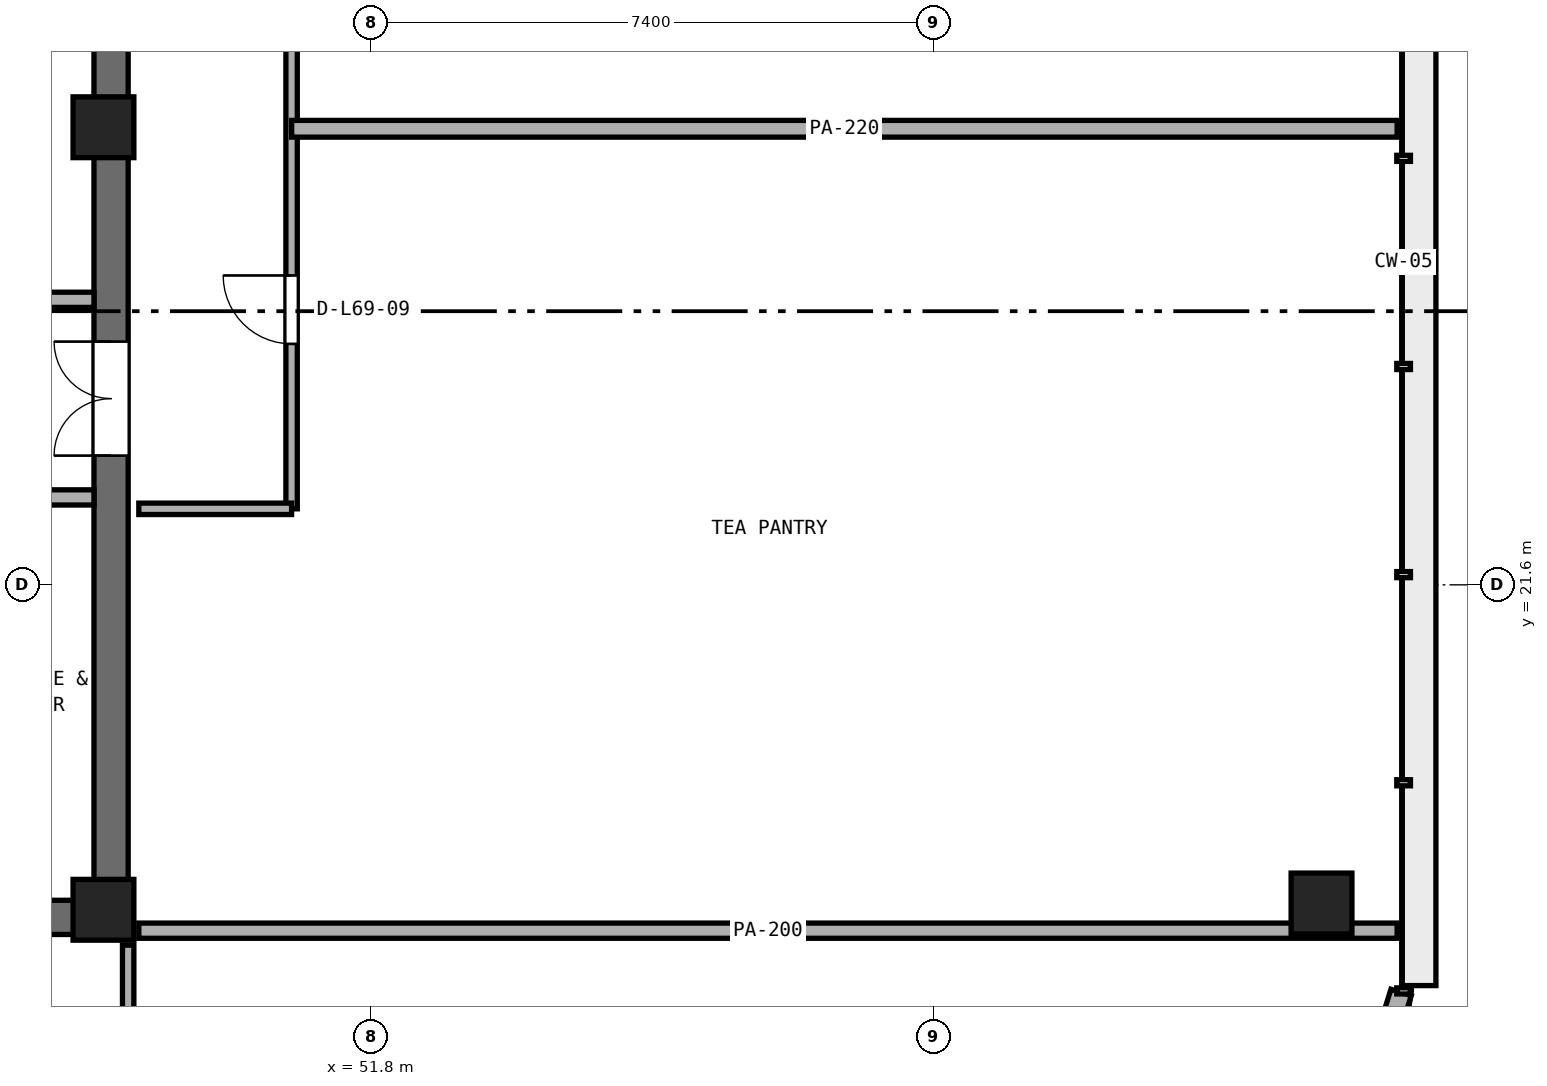
"""IFC4 building model, lengths in metres.
Left out: names, types, materials, properties, quantities, classifications, styles, units other than length and angle.
Written with IfcOpenShell. Run it as: python <this file> out.ifc"""

import sys

from ifc_helpers import new_model, si_unit, direction, frame, frame_2d, origin, origin_2d, place, context, subcontext, project, spatial, rectangle, extrude, element, fill, save


model = new_model("IFC4")
c1 = context("Model", 3, precision=1e-05, world=origin(), true_north=direction((0.0, 1.0)))
c2 = subcontext(c1, "Body", "Model", "MODEL_VIEW")
j1 = project(units=[si_unit("LENGTHUNIT", "METRE"), si_unit("PLANEANGLEUNIT", "RADIAN")], contexts=[c1])
p1 = place(None, origin())
s1 = spatial("IfcSite", under=j1, at=p1, CompositionType="ELEMENT")
p2 = place(p1, origin())
s2 = spatial("IfcBuilding", under=s1, at=p2, CompositionType="ELEMENT")
p3 = place(p2, frame((0.0, 0.0, 270.6)))
s3 = spatial("IfcBuildingStorey", under=s2, at=p3, CompositionType="ELEMENT", Elevation=270.6)
p4 = place(p3, frame((25.4, 17.225, 0.0), z_axis=(0.0, 0.0, 1.0), x_axis=(1.0, 0.0, 0.0)))
e1 = element("IfcWall", 1, at=p4, inside=s3, PredefinedType="SHEAR", context=c2, shape_type="SweptSolid", body=[
    extrude(rectangle(XDim=23.2, YDim=0.45, at=frame_2d((11.6, 0.0))), origin(), (0.0, 0.0, 1.0), 3.54),
])
p5 = place(p3, frame((48.375, 17.45, 0.0), z_axis=(0.0, 0.0, 1.0), x_axis=(0.0, 1.0, 0.0)))
e2 = element("IfcWall", 2, at=p5, inside=s3, PredefinedType="SHEAR", context=c2, shape_type="SweptSolid", body=[
    extrude(rectangle(XDim=15.5, YDim=0.45, at=frame_2d((7.75, 0.0))), origin(), (0.0, 0.0, 1.0), 3.54),
])
p6 = place(p5, frame((5.85, 0.0, 0.0)))
e3 = element("IfcOpeningElement", 3, at=p6, cuts=e2, PredefinedType="OPENING", context=c2, shape_type="SweptSolid", body=[
    extrude(rectangle(XDim=1.5, YDim=2.15, at=frame_2d((0.75, 1.075))), frame((0.0, 0.235, 0.0), z_axis=(0.0, -1.0, 0.0), x_axis=(1.0, 0.0, 0.0)), (0.0, 0.0, 1.0), 0.47),
])
for number, where, z_axis, x_axis in (
    (4, (48.275, 17.325, 0.0), (0.0, 0.0, 1.0), (1.0, 0.0, 0.0)),
    (5, (48.275, 27.62, 0.0), (0.0, 0.0, 1.0), (1.0, 0.0, 0.0)),
):
    element("IfcColumn", number, at=place(p3, frame(where, z_axis=z_axis, x_axis=x_axis)), inside=s3, PredefinedType="PILASTER", context=c2, shape_type="SweptSolid", body=[
        extrude(rectangle(XDim=0.8, YDim=0.8, at=origin_2d()), origin(), (0.0, 0.0, 1.0), 3.8),
    ])
p7 = place(p3, frame((64.3, 17.408, 0.0), z_axis=(0.0, 0.0, 1.0), x_axis=(1.0, 0.0, 0.0)))
e6 = element("IfcColumn", 6, at=p7, inside=s3, PredefinedType="COLUMN", context=c2, shape_type="SweptSolid", body=[
    extrude(rectangle(XDim=0.8, YDim=0.8, at=origin_2d()), origin(), (0.0, 0.0, 1.0), 3.8),
])
p8 = place(p3, frame((42.0, 22.75, 0.0), z_axis=(0.0, 0.0, 1.0), x_axis=(1.0, 0.0, 0.0)))
e7 = element("IfcWall", 7, at=p8, inside=s3, PredefinedType="SOLIDWALL", context=c2, shape_type="SweptSolid", body=[
    extrude(rectangle(XDim=6.15, YDim=0.2, at=frame_2d((3.075, 0.0))), origin(), (0.0, 0.0, 1.0), 3.54),
])
p9 = place(p3, frame((46.1, 25.35, 0.0), z_axis=(0.0, 0.0, 1.0), x_axis=(1.0, 0.0, 0.0)))
e8 = element("IfcWall", 8, at=p9, inside=s3, PredefinedType="SOLIDWALL", context=c2, shape_type="SweptSolid", body=[
    extrude(rectangle(XDim=2.05, YDim=0.2, at=frame_2d((1.025, 0.0))), origin(), (0.0, 0.0, 1.0), 3.54),
])
p10 = place(p3, frame((50.75, 22.6, 0.0), z_axis=(0.0, 0.0, 1.0), x_axis=(0.0, 1.0, 0.0)))
e9 = element("IfcWall", 9, at=p10, inside=s3, PredefinedType="PARTITIONING", context=c2, shape_type="SweptSolid", body=[
    extrude(rectangle(XDim=12.95, YDim=0.15, at=frame_2d((6.475, 0.0))), origin(), (0.0, 0.0, 1.0), 3.54),
])
p11 = place(p10, frame((2.17, 0.0, 0.0)))
e10 = element("IfcOpeningElement", 10, at=p11, cuts=e9, PredefinedType="OPENING", context=c2, shape_type="SweptSolid", body=[
    extrude(rectangle(XDim=0.9, YDim=2.1, at=frame_2d((0.45, 1.05))), frame((0.0, 0.085, 0.0), z_axis=(0.0, -1.0, 0.0), x_axis=(1.0, 0.0, 0.0)), (0.0, 0.0, 1.0), 0.17),
])
p12 = place(p10, frame((7.375, 0.0, 0.0)))
e11 = element("IfcOpeningElement", 11, at=p12, cuts=e9, PredefinedType="OPENING", context=c2, shape_type="SweptSolid", body=[
    extrude(rectangle(XDim=1.0, YDim=2.12, at=frame_2d((0.5, 1.06))), frame((0.0, 0.085, 0.0), z_axis=(0.0, -1.0, 0.0), x_axis=(1.0, 0.0, 0.0)), (0.0, 0.0, 1.0), 0.17),
])
p13 = place(p3, frame((48.6, 14.85, 0.0), z_axis=(0.0, 0.0, 1.0), x_axis=(0.0, 1.0, 0.0)))
e12 = element("IfcWall", 12, at=p13, inside=s3, PredefinedType="PARTITIONING", context=c2, shape_type="SweptSolid", body=[
    extrude(rectangle(XDim=2.01, YDim=0.15, at=frame_2d((1.005, 0.0))), origin(), (0.0, 0.0, 1.0), 2.19),
])
p14 = place(p3, frame((48.74, 17.05, 0.0), z_axis=(0.0, 0.0, 1.0), x_axis=(1.0, 0.0, 0.0)))
e13 = element("IfcWall", 13, at=p14, inside=s3, PredefinedType="PARTITIONING", context=c2, shape_type="SweptSolid", body=[
    extrude(rectangle(XDim=16.555, YDim=0.2, at=frame_2d((8.277, 0.0))), origin(), (0.0, 0.0, 1.0), 2.19),
])
p15 = place(p3, frame((48.74, 22.6, 0.0), z_axis=(0.0, 0.0, 1.0), x_axis=(1.0, 0.0, 0.0)))
e14 = element("IfcWall", 14, at=p15, inside=s3, PredefinedType="PARTITIONING", context=c2, shape_type="SweptSolid", body=[
    extrude(rectangle(XDim=2.01, YDim=0.15, at=frame_2d((1.005, 0.0))), origin(), (0.0, 0.0, 1.0), 3.54),
])
p16 = place(p3, frame((50.751, 27.6, 0.0), z_axis=(0.0, 0.0, 1.0), x_axis=(1.0, 0.0, 0.0)))
e15 = element("IfcWall", 15, at=p16, inside=s3, PredefinedType="PARTITIONING", context=c2, shape_type="SweptSolid", body=[
    extrude(rectangle(XDim=14.544, YDim=0.22, at=frame_2d((7.272, 0.0))), origin(), (0.0, 0.0, 1.0), 3.54),
])
p17 = place(p3, frame((64.635, 13.962, 0.0), z_axis=(0.0, 0.0, 1.0), x_axis=(0.298601492944, 0.954377885542, 0.0)))
e16 = element("IfcWall", 16, at=p17, inside=s3, PredefinedType="STANDARD", context=c2, shape_type="SweptSolid", body=[
    extrude(rectangle(XDim=2.384, YDim=0.28, at=frame_2d((1.192, 0.0))), origin(), (0.0, 0.0, 1.0), 3.54),
])
p18 = place(p6, origin())
e17 = element("IfcDoor", 17, at=p18, inside=s3, OperationType="DOUBLE_DOOR_SINGLE_SWING", PredefinedType="DOOR", context=c2, shape_type="SweptSolid", body=[
    extrude(rectangle(XDim=1.5, YDim=2.15, at=frame_2d((0.75, 1.075))), frame((0.0, 0.025, 0.0), z_axis=(0.0, -1.0, 0.0), x_axis=(1.0, 0.0, 0.0)), (0.0, 0.0, 1.0), 0.05),
])
fill(e3, e17)
p19 = place(p11, origin())
e18 = element("IfcDoor", 18, at=p19, inside=s3, OperationType="SINGLE_SWING_RIGHT", PredefinedType="DOOR", context=c2, shape_type="SweptSolid", body=[
    extrude(rectangle(XDim=0.9, YDim=2.1, at=frame_2d((0.45, 1.05))), frame((0.0, 0.025, 0.0), z_axis=(0.0, -1.0, 0.0), x_axis=(1.0, 0.0, 0.0)), (0.0, 0.0, 1.0), 0.05),
])
fill(e10, e18)
save(model, sys.argv[1])
